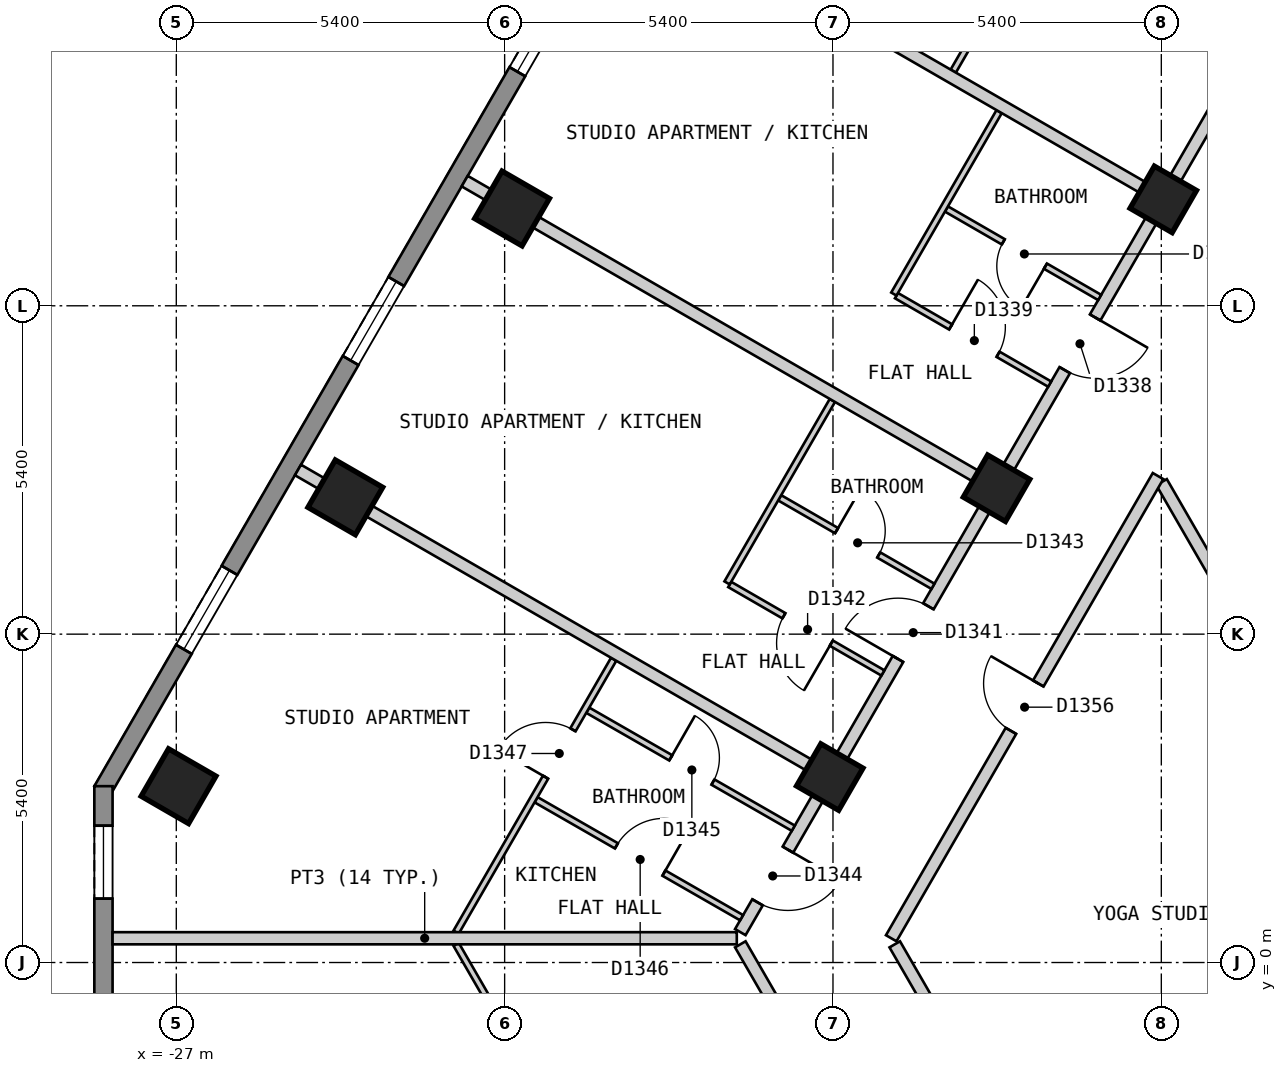
"""IFC4 building model, lengths in metres.
Left out: names, types, materials, properties, quantities, classifications, styles, units other than length and angle.
Written with IfcOpenShell. Run it as: python <this file> out.ifc"""

import sys

from ifc_helpers import new_model, si_unit, direction, frame, frame_2d, origin, origin_2d, place, context, subcontext, project, spatial, polyline, rectangle, outline, extrude, element, fill, save


model = new_model("IFC4")
c1 = context("Model", 3, precision=1e-05, world=origin(), true_north=direction((0.0, 1.0)))
c2 = subcontext(c1, "Body", "Model", "MODEL_VIEW")
j1 = project(units=[si_unit("LENGTHUNIT", "METRE"), si_unit("PLANEANGLEUNIT", "RADIAN")], contexts=[c1])
p1 = place(None, origin())
s1 = spatial("IfcSite", under=j1, at=p1, CompositionType="ELEMENT")
p2 = place(p1, origin())
s2 = spatial("IfcBuilding", under=s1, at=p2, CompositionType="ELEMENT")
p3 = place(p2, frame((0.0, 0.0, 147.6)))
s3 = spatial("IfcBuildingStorey", under=s2, at=p3, CompositionType="ELEMENT", Elevation=147.6)
for number, where, z_axis, x_axis in (
    (1, (-21.478, 12.4, 0.0), (0.0, 0.0, 1.0), (-0.5, -0.866, 0.0)),
    (2, (-24.22, 7.65, 0.0), (0.0, 0.0, 1.0), (-0.5, -0.866, 0.0)),
    (3, (-26.963, 2.9, 0.0), (0.0, 0.0, 1.0), (-0.5, -0.866, 0.0)),
):
    element("IfcColumn", number, at=place(p3, frame(where, z_axis=z_axis, x_axis=x_axis)), inside=s3, PredefinedType="COLUMN", context=c2, shape_type="SweptSolid", body=[
        extrude(rectangle(XDim=0.9, YDim=0.9, at=origin_2d()), origin(), (0.0, 0.0, 1.0), 3.0),
    ])
for number, where, z_axis, x_axis in (
    (4, (-10.768, 12.55, 0.0), (0.0, 0.0, 1.0), (-0.5, -0.866, 0.0)),
    (5, (-13.51, 7.8, 0.0), (0.0, 0.0, 1.0), (-0.5, -0.866, 0.0)),
    (6, (-16.253, 3.05, 0.0), (0.0, 0.0, 1.0), (-0.5, -0.866, 0.0)),
):
    element("IfcColumn", number, at=place(p3, frame(where, z_axis=z_axis, x_axis=x_axis)), inside=s3, PredefinedType="COLUMN", context=c2, shape_type="SweptSolid", body=[
        extrude(rectangle(XDim=0.8, YDim=0.8, at=origin_2d()), origin(), (0.0, 0.0, 1.0), 3.0),
    ])
p4 = place(p3, frame((-16.555, 23.025, 0.0), z_axis=(0.0, 0.0, 1.0), x_axis=(-0.500020536353, -0.866013546791, 0.0)))
e7 = element("IfcWall", 7, at=p4, inside=s3, PredefinedType="SOLIDWALL", context=c2, shape_type="SweptSolid", body=[
    extrude(outline(polyline([(0.0, -0.15), (23.325, -0.15), (23.245, 0.15), (0.08, 0.15), (0.0, -0.15)])), origin(), (0.0, 0.0, 1.0), 2.7),
])
p5 = place(p4, frame((2.685, 0.0, 0.15)))
e8 = element("IfcOpeningElement", 8, at=p5, cuts=e7, PredefinedType="OPENING", context=c2, shape_type="SweptSolid", body=[
    extrude(rectangle(XDim=1.5, YDim=2.1, at=frame_2d((0.75, 1.05))), frame((0.0, 0.16, 0.0), z_axis=(0.0, -1.0, 0.0), x_axis=(1.0, 0.0, 0.0)), (0.0, 0.0, 1.0), 0.32),
])
p6 = place(p4, frame((8.171, 0.0, 0.15)))
e9 = element("IfcOpeningElement", 9, at=p6, cuts=e7, PredefinedType="OPENING", context=c2, shape_type="SweptSolid", body=[
    extrude(rectangle(XDim=1.5, YDim=2.1, at=frame_2d((0.75, 1.05))), frame((0.0, 0.16, 0.0), z_axis=(0.0, -1.0, 0.0), x_axis=(1.0, 0.0, 0.0)), (0.0, 0.0, 1.0), 0.32),
])
p7 = place(p4, frame((13.655, 0.0, 0.15)))
e10 = element("IfcOpeningElement", 10, at=p7, cuts=e7, PredefinedType="OPENING", context=c2, shape_type="SweptSolid", body=[
    extrude(rectangle(XDim=1.5, YDim=2.1, at=frame_2d((0.75, 1.05))), frame((0.0, 0.16, 0.0), z_axis=(0.0, -1.0, 0.0), x_axis=(1.0, 0.0, 0.0)), (0.0, 0.0, 1.0), 0.32),
])
p8 = place(p4, frame((19.14, 0.0, 0.15)))
e11 = element("IfcOpeningElement", 11, at=p8, cuts=e7, PredefinedType="OPENING", context=c2, shape_type="SweptSolid", body=[
    extrude(rectangle(XDim=1.5, YDim=2.1, at=frame_2d((0.75, 1.05))), frame((0.0, 0.16, 0.0), z_axis=(0.0, -1.0, 0.0), x_axis=(1.0, 0.0, 0.0)), (0.0, 0.0, 1.0), 0.32),
])
p9 = place(p3, frame((-28.198, 2.9, 0.0), z_axis=(0.0, 0.0, 1.0), x_axis=(0.0, -1.0, 0.0)))
e12 = element("IfcWall", 12, at=p9, inside=s3, PredefinedType="SOLIDWALL", context=c2, shape_type="SweptSolid", body=[
    extrude(outline(polyline([(0.0, -0.15), (5.0, -0.15), (4.92, 0.15), (0.08, 0.15), (0.0, -0.15)])), origin(), (0.0, 0.0, 1.0), 2.7),
])
p10 = place(p9, frame((0.65, 0.0, 0.15)))
e13 = element("IfcOpeningElement", 13, at=p10, cuts=e12, PredefinedType="OPENING", context=c2, shape_type="SweptSolid", body=[
    extrude(rectangle(XDim=1.2, YDim=2.1, at=frame_2d((0.6, 1.05))), frame((0.0, 0.16, 0.0), z_axis=(0.0, -1.0, 0.0), x_axis=(1.0, 0.0, 0.0)), (0.0, 0.0, 1.0), 0.32),
])
p11 = place(p3, frame((-10.796, 7.9, 0.0), z_axis=(0.0, 0.0, 1.0), x_axis=(0.499954271211, -0.866051803703, 0.0)))
e14 = element("IfcWall", 14, at=p11, inside=s3, PredefinedType="PARTITIONING", context=c2, shape_type="SweptSolid", body=[
    extrude(rectangle(XDim=7.536, YDim=0.2, at=frame_2d((3.768, 0.0))), origin(), (0.0, 0.0, 1.0), 2.7),
])
p12 = place(p3, frame((-15.184, 0.299, 0.0), z_axis=(0.0, 0.0, 1.0), x_axis=(0.500149577091, -0.865939028186, 0.0)))
e15 = element("IfcWall", 15, at=p12, inside=s3, PredefinedType="PARTITIONING", context=c2, shape_type="SweptSolid", body=[
    extrude(rectangle(XDim=3.463, YDim=0.2, at=frame_2d((1.732, 0.0))), origin(), (0.0, 0.0, 1.0), 2.7),
])
p13 = place(p3, frame((-17.724, 0.299, 0.0), z_axis=(0.0, 0.0, 1.0), x_axis=(0.499923815713, -0.866069384335, 0.0)))
e16 = element("IfcWall", 16, at=p13, inside=s3, PredefinedType="PARTITIONING", context=c2, shape_type="SweptSolid", body=[
    extrude(rectangle(XDim=3.289, YDim=0.2, at=frame_2d((1.644, 0.0))), origin(), (0.0, 0.0, 1.0), 2.7),
])
p14 = place(p3, frame((-15.242, 0.399, 0.0), z_axis=(0.0, 0.0, 1.0), x_axis=(0.499953615651, 0.866052182145, 0.0)))
e17 = element("IfcWall", 17, at=p14, inside=s3, PredefinedType="PARTITIONING", context=c2, shape_type="SweptSolid", body=[
    extrude(rectangle(XDim=8.777, YDim=0.2, at=frame_2d((4.388, 0.0))), origin(), (0.0, 0.0, 1.0), 2.7),
])
p15 = place(p14, frame((3.938, 0.0, 0.0)))
e18 = element("IfcOpeningElement", 18, at=p15, cuts=e17, PredefinedType="OPENING", context=c2, shape_type="SweptSolid", body=[
    extrude(rectangle(XDim=0.9, YDim=2.1, at=frame_2d((0.45, 1.05))), frame((0.0, 0.11, 0.0), z_axis=(0.0, -1.0, 0.0), x_axis=(1.0, 0.0, 0.0)), (0.0, 0.0, 1.0), 0.22),
])
p16 = place(p3, frame((-17.724, 0.5, 0.0), z_axis=(0.0, 0.0, 1.0), x_axis=(0.499994801602, 0.86602840506, 0.0)))
e19 = element("IfcWall", 19, at=p16, inside=s3, PredefinedType="PARTITIONING", context=c2, shape_type="SweptSolid", body=[
    extrude(rectangle(XDim=16.916, YDim=0.2, at=frame_2d((8.458, 0.0))), origin(), (0.0, 0.0, 1.0), 2.7),
])
p17 = place(p16, frame((10.672, 0.0, 0.0)))
e20 = element("IfcOpeningElement", 20, at=p17, cuts=e19, PredefinedType="OPENING", context=c2, shape_type="SweptSolid", body=[
    extrude(rectangle(XDim=1.0, YDim=2.1, at=frame_2d((0.5, 1.05))), frame((0.0, 0.11, 0.0), z_axis=(0.0, -1.0, 0.0), x_axis=(1.0, 0.0, 0.0)), (0.0, 0.0, 1.0), 0.22),
])
p18 = place(p16, frame((5.187, 0.0, 0.0)))
e21 = element("IfcOpeningElement", 21, at=p18, cuts=e19, PredefinedType="OPENING", context=c2, shape_type="SweptSolid", body=[
    extrude(rectangle(XDim=1.0, YDim=2.1, at=frame_2d((0.5, 1.05))), frame((0.0, 0.11, 0.0), z_axis=(0.0, -1.0, 0.0), x_axis=(1.0, 0.0, 0.0)), (0.0, 0.0, 1.0), 0.22),
])
p19 = place(p16, frame((0.566, 0.0, 0.0)))
e22 = element("IfcOpeningElement", 22, at=p19, cuts=e19, PredefinedType="OPENING", context=c2, shape_type="SweptSolid", body=[
    extrude(rectangle(XDim=1.0, YDim=2.1, at=frame_2d((0.5, 1.05))), frame((0.0, 0.11, 0.0), z_axis=(0.0, -1.0, 0.0), x_axis=(1.0, 0.0, 0.0)), (0.0, 0.0, 1.0), 0.22),
])
p20 = place(p3, frame((-22.398, 0.299, 0.0), z_axis=(0.0, 0.0, 1.0), x_axis=(0.50004249738, -0.86600086652, 0.0)))
e23 = element("IfcWall", 23, at=p20, inside=s3, PredefinedType="PARTITIONING", context=c2, shape_type="SweptSolid", body=[
    extrude(rectangle(XDim=3.236, YDim=0.1, at=frame_2d((1.618, 0.0))), origin(), (0.0, 0.0, 1.0), 2.7),
])
p21 = place(p3, frame((-17.898, 6.217, 0.0), z_axis=(0.0, 0.0, 1.0), x_axis=(0.86592000186, -0.500182517066, 0.0)))
e24 = element("IfcWall", 24, at=p21, inside=s3, PredefinedType="PARTITIONING", context=c2, shape_type="SweptSolid", body=[
    extrude(rectangle(XDim=2.909, YDim=0.1, at=frame_2d((1.455, 0.0))), origin(), (0.0, 0.0, 1.0), 2.7),
])
p22 = place(p21, frame((1.029, 0.0, 0.0)))
e25 = element("IfcOpeningElement", 25, at=p22, cuts=e24, PredefinedType="OPENING", context=c2, shape_type="SweptSolid", body=[
    extrude(rectangle(XDim=0.9, YDim=2.1, at=frame_2d((0.45, 1.05))), frame((0.0, 0.06, 0.0), z_axis=(0.0, -1.0, 0.0), x_axis=(1.0, 0.0, 0.0)), (0.0, 0.0, 1.0), 0.12),
])
p23 = place(p3, frame((-20.233, 4.149, 0.0), z_axis=(0.0, 0.0, 1.0), x_axis=(0.867293167797, -0.497797711016, 0.0)))
e26 = element("IfcWall", 26, at=p23, inside=s3, PredefinedType="PARTITIONING", context=c2, shape_type="SweptSolid", body=[
    extrude(rectangle(XDim=3.897, YDim=0.1, at=frame_2d((1.948, 0.0))), origin(), (0.0, 0.0, 1.0), 2.7),
])
p24 = place(p23, frame((1.574, 0.0, 0.0)))
e27 = element("IfcOpeningElement", 27, at=p24, cuts=e26, PredefinedType="OPENING", context=c2, shape_type="SweptSolid", body=[
    extrude(rectangle(XDim=0.8, YDim=2.1, at=frame_2d((0.4, 1.05))), frame((0.0, 0.06, 0.0), z_axis=(0.0, -1.0, 0.0), x_axis=(1.0, 0.0, 0.0)), (0.0, 0.0, 1.0), 0.12),
])
p25 = place(p3, frame((-21.083, 2.677, 0.0), z_axis=(0.0, 0.0, 1.0), x_axis=(0.867308690764, -0.497770664991, 0.0)))
e28 = element("IfcWall", 28, at=p25, inside=s3, PredefinedType="PARTITIONING", context=c2, shape_type="SweptSolid", body=[
    extrude(rectangle(XDim=3.897, YDim=0.1, at=frame_2d((1.949, 0.0))), origin(), (0.0, 0.0, 1.0), 2.7),
])
p26 = place(p25, frame((1.524, 0.0, 0.0)))
e29 = element("IfcOpeningElement", 29, at=p26, cuts=e28, PredefinedType="OPENING", context=c2, shape_type="SweptSolid", body=[
    extrude(rectangle(XDim=0.9, YDim=2.1, at=frame_2d((0.45, 1.05))), frame((0.0, 0.06, 0.0), z_axis=(0.0, -1.0, 0.0), x_axis=(1.0, 0.0, 0.0)), (0.0, 0.0, 1.0), 0.12),
])
p27 = place(p3, frame((-17.076, 7.642, 0.0), z_axis=(0.0, 0.0, 1.0), x_axis=(0.866003949776, -0.500037157592, 0.0)))
e30 = element("IfcWall", 30, at=p27, inside=s3, PredefinedType="PARTITIONING", context=c2, shape_type="SweptSolid", body=[
    extrude(rectangle(XDim=2.91, YDim=0.1, at=frame_2d((1.455, 0.0))), origin(), (0.0, 0.0, 1.0), 2.7),
])
p28 = place(p27, frame((1.08, 0.0, 0.0)))
e31 = element("IfcOpeningElement", 31, at=p28, cuts=e30, PredefinedType="OPENING", context=c2, shape_type="SweptSolid", body=[
    extrude(rectangle(XDim=0.8, YDim=2.1, at=frame_2d((0.4, 1.05))), frame((0.0, 0.06, 0.0), z_axis=(0.0, -1.0, 0.0), x_axis=(1.0, 0.0, 0.0)), (0.0, 0.0, 1.0), 0.12),
])
p29 = place(p3, frame((-14.334, 12.392, 0.0), z_axis=(0.0, 0.0, 1.0), x_axis=(0.866003949776, -0.500037157592, 0.0)))
e32 = element("IfcWall", 32, at=p29, inside=s3, PredefinedType="PARTITIONING", context=c2, shape_type="SweptSolid", body=[
    extrude(rectangle(XDim=2.91, YDim=0.1, at=frame_2d((1.455, 0.0))), origin(), (0.0, 0.0, 1.0), 2.7),
])
p30 = place(p29, frame((1.08, 0.0, 0.0)))
e33 = element("IfcOpeningElement", 33, at=p30, cuts=e32, PredefinedType="OPENING", context=c2, shape_type="SweptSolid", body=[
    extrude(rectangle(XDim=0.8, YDim=2.1, at=frame_2d((0.4, 1.05))), frame((0.0, 0.06, 0.0), z_axis=(0.0, -1.0, 0.0), x_axis=(1.0, 0.0, 0.0)), (0.0, 0.0, 1.0), 0.12),
])
p31 = place(p3, frame((-15.156, 10.967, 0.0), z_axis=(0.0, 0.0, 1.0), x_axis=(0.866003949776, -0.500037157592, 0.0)))
e34 = element("IfcWall", 34, at=p31, inside=s3, PredefinedType="PARTITIONING", context=c2, shape_type="SweptSolid", body=[
    extrude(rectangle(XDim=2.91, YDim=0.1, at=frame_2d((1.455, 0.0))), origin(), (0.0, 0.0, 1.0), 2.7),
])
p32 = place(p31, frame((1.029, 0.0, 0.0)))
e35 = element("IfcOpeningElement", 35, at=p32, cuts=e34, PredefinedType="OPENING", context=c2, shape_type="SweptSolid", body=[
    extrude(rectangle(XDim=0.9, YDim=2.1, at=frame_2d((0.45, 1.05))), frame((0.0, 0.06, 0.0), z_axis=(0.0, -1.0, 0.0), x_axis=(1.0, 0.0, 0.0)), (0.0, 0.0, 1.0), 0.12),
])
p33 = place(p3, frame((-17.942, 6.243, 0.0), z_axis=(0.0, 0.0, 1.0), x_axis=(0.49997462182, 0.866040055388, 0.0)))
e36 = element("IfcWall", 36, at=p33, inside=s3, PredefinedType="PARTITIONING", context=c2, shape_type="SweptSolid", body=[
    extrude(rectangle(XDim=3.464, YDim=0.1, at=frame_2d((1.732, 0.0))), origin(), (0.0, 0.0, 1.0), 2.7),
])
p34 = place(p3, frame((-15.199, 10.993, 0.0), z_axis=(0.0, 0.0, 1.0), x_axis=(0.499885210257, 0.866091667531, 0.0)))
e37 = element("IfcWall", 37, at=p34, inside=s3, PredefinedType="PARTITIONING", context=c2, shape_type="SweptSolid", body=[
    extrude(rectangle(XDim=3.463, YDim=0.1, at=frame_2d((1.731, 0.0))), origin(), (0.0, 0.0, 1.0), 2.7),
])
p35 = place(p3, frame((-22.398, 0.499, 0.0), z_axis=(0.0, 0.0, 1.0), x_axis=(0.499984806807, 0.866034175401, 0.0)))
e38 = element("IfcWall", 38, at=p35, inside=s3, PredefinedType="PARTITIONING", context=c2, shape_type="SweptSolid", body=[
    extrude(rectangle(XDim=5.182, YDim=0.1, at=frame_2d((2.591, 0.0))), origin(), (0.0, 0.0, 1.0), 2.7),
])
p36 = place(p35, frame((2.943, 0.0, 0.0)))
e39 = element("IfcOpeningElement", 39, at=p36, cuts=e38, PredefinedType="OPENING", context=c2, shape_type="SweptSolid", body=[
    extrude(rectangle(XDim=0.9, YDim=2.1, at=frame_2d((0.45, 1.05))), frame((0.0, 0.06, 0.0), z_axis=(0.0, -1.0, 0.0), x_axis=(1.0, 0.0, 0.0)), (0.0, 0.0, 1.0), 0.12),
])
p37 = place(p3, frame((-14.222, 14.659, 0.0), z_axis=(0.0, 0.0, 1.0), x_axis=(0.500053212623, 0.865994679283, 0.0)))
e40 = element("IfcWall", 40, at=p37, inside=s3, PredefinedType="PARTITIONING", context=c2, shape_type="SweptSolid", body=[
    extrude(rectangle(XDim=5.239, YDim=0.1, at=frame_2d((2.62, 0.0))), origin(), (0.0, 0.0, 1.0), 2.7),
])
p38 = place(p37, frame((2.198, 0.0, 0.0)))
e41 = element("IfcOpeningElement", 41, at=p38, cuts=e40, PredefinedType="OPENING", context=c2, shape_type="SweptSolid", body=[
    extrude(rectangle(XDim=0.8, YDim=2.1, at=frame_2d((0.4, 1.05))), frame((0.0, 0.06, 0.0), z_axis=(0.0, -1.0, 0.0), x_axis=(1.0, 0.0, 0.0)), (0.0, 0.0, 1.0), 0.12),
])
p39 = place(p3, frame((-24.999, 8.1, 0.0), z_axis=(0.0, 0.0, 1.0), x_axis=(0.866016855193, -0.500014806302, 0.0)))
e42 = element("IfcWall", 42, at=p39, inside=s3, PredefinedType="PARTITIONING", context=c2, shape_type="SweptSolid", body=[
    extrude(rectangle(XDim=10.0, YDim=0.2, at=frame_2d((5.0, 0.0))), origin(), (0.0, 0.0, 1.0), 2.7),
])
p40 = place(p3, frame((-22.257, 12.85, 0.0), z_axis=(0.0, 0.0, 1.0), x_axis=(0.866047370643, -0.499961950354, 0.0)))
e43 = element("IfcWall", 43, at=p40, inside=s3, PredefinedType="PARTITIONING", context=c2, shape_type="SweptSolid", body=[
    extrude(rectangle(XDim=10.001, YDim=0.2, at=frame_2d((5.0, 0.0))), origin(), (0.0, 0.0, 1.0), 2.7),
])
p41 = place(p3, frame((-19.514, 17.599, 0.0), z_axis=(0.0, 0.0, 1.0), x_axis=(0.866059142644, -0.499941558027, 0.0)))
e44 = element("IfcWall", 44, at=p41, inside=s3, PredefinedType="PARTITIONING", context=c2, shape_type="SweptSolid", body=[
    extrude(rectangle(XDim=9.999, YDim=0.2, at=frame_2d((5.0, 0.0))), origin(), (0.0, 0.0, 1.0), 2.7),
])
p42 = place(p3, frame((-28.048, 0.399, 0.0), z_axis=(0.0, 0.0, 1.0), x_axis=(1.0, 0.0, 0.0)))
e45 = element("IfcWall", 45, at=p42, inside=s3, PredefinedType="PARTITIONING", context=c2, shape_type="SweptSolid", body=[
    extrude(rectangle(XDim=10.266, YDim=0.2, at=frame_2d((5.133, 0.0))), origin(), (0.0, 0.0, 1.0), 2.7),
])
p43 = place(p6, origin())
e46 = element("IfcWindow", 46, at=p43, inside=s3, PartitioningType="SINGLE_PANEL", PredefinedType="WINDOW", context=c2, shape_type="SweptSolid", body=[
    extrude(rectangle(XDim=1.5, YDim=2.1, at=frame_2d((0.75, 1.05))), frame((0.0, 0.03, 0.0), z_axis=(0.0, -1.0, 0.0), x_axis=(1.0, 0.0, 0.0)), (0.0, 0.0, 1.0), 0.06),
])
fill(e9, e46)
p44 = place(p7, origin())
e47 = element("IfcWindow", 47, at=p44, inside=s3, PartitioningType="SINGLE_PANEL", PredefinedType="WINDOW", context=c2, shape_type="SweptSolid", body=[
    extrude(rectangle(XDim=1.5, YDim=2.1, at=frame_2d((0.75, 1.05))), frame((0.0, 0.03, 0.0), z_axis=(0.0, -1.0, 0.0), x_axis=(1.0, 0.0, 0.0)), (0.0, 0.0, 1.0), 0.06),
])
fill(e10, e47)
p45 = place(p8, origin())
e48 = element("IfcWindow", 48, at=p45, inside=s3, PartitioningType="SINGLE_PANEL", PredefinedType="WINDOW", context=c2, shape_type="SweptSolid", body=[
    extrude(rectangle(XDim=1.5, YDim=2.1, at=frame_2d((0.75, 1.05))), frame((0.0, 0.03, 0.0), z_axis=(0.0, -1.0, 0.0), x_axis=(1.0, 0.0, 0.0)), (0.0, 0.0, 1.0), 0.06),
])
fill(e11, e48)
p46 = place(p10, origin())
e49 = element("IfcWindow", 49, at=p46, inside=s3, PartitioningType="SINGLE_PANEL", PredefinedType="WINDOW", context=c2, shape_type="SweptSolid", body=[
    extrude(rectangle(XDim=1.2, YDim=2.1, at=frame_2d((0.6, 1.05))), frame((0.0, 0.03, 0.0), z_axis=(0.0, -1.0, 0.0), x_axis=(1.0, 0.0, 0.0)), (0.0, 0.0, 1.0), 0.06),
])
fill(e13, e49)
p47 = place(p17, origin())
e50 = element("IfcDoor", 50, at=p47, inside=s3, OperationType="SINGLE_SWING_RIGHT", PredefinedType="DOOR", context=c2, shape_type="SweptSolid", body=[
    extrude(rectangle(XDim=1.0, YDim=2.1, at=frame_2d((0.5, 1.05))), frame((0.0, 0.025, 0.0), z_axis=(0.0, -1.0, 0.0), x_axis=(1.0, 0.0, 0.0)), (0.0, 0.0, 1.0), 0.05),
])
fill(e20, e50)
p48 = place(p32, origin())
e51 = element("IfcDoor", 51, at=p48, inside=s3, OperationType="SINGLE_SWING_LEFT", PredefinedType="DOOR", context=c2, shape_type="SweptSolid", body=[
    extrude(rectangle(XDim=0.9, YDim=2.1, at=frame_2d((0.45, 1.05))), frame((0.0, 0.025, 0.0), z_axis=(0.0, -1.0, 0.0), x_axis=(1.0, 0.0, 0.0)), (0.0, 0.0, 1.0), 0.05),
])
fill(e35, e51)
p49 = place(p30, origin())
e52 = element("IfcDoor", 52, at=p49, inside=s3, OperationType="SINGLE_SWING_RIGHT", PredefinedType="DOOR", context=c2, shape_type="SweptSolid", body=[
    extrude(rectangle(XDim=0.8, YDim=2.1, at=frame_2d((0.4, 1.05))), frame((0.0, 0.025, 0.0), z_axis=(0.0, -1.0, 0.0), x_axis=(1.0, 0.0, 0.0)), (0.0, 0.0, 1.0), 0.05),
])
fill(e33, e52)
p50 = place(p18, origin())
e53 = element("IfcDoor", 53, at=p50, inside=s3, OperationType="SINGLE_SWING_LEFT", PredefinedType="DOOR", context=c2, shape_type="SweptSolid", body=[
    extrude(rectangle(XDim=1.0, YDim=2.1, at=frame_2d((0.5, 1.05))), frame((0.0, 0.025, 0.0), z_axis=(0.0, -1.0, 0.0), x_axis=(1.0, 0.0, 0.0)), (0.0, 0.0, 1.0), 0.05),
])
fill(e21, e53)
p51 = place(p22, origin())
e54 = element("IfcDoor", 54, at=p51, inside=s3, OperationType="SINGLE_SWING_RIGHT", PredefinedType="DOOR", context=c2, shape_type="SweptSolid", body=[
    extrude(rectangle(XDim=0.9, YDim=2.1, at=frame_2d((0.45, 1.05))), frame((0.0, 0.025, 0.0), z_axis=(0.0, -1.0, 0.0), x_axis=(1.0, 0.0, 0.0)), (0.0, 0.0, 1.0), 0.05),
])
fill(e25, e54)
p52 = place(p28, origin())
e55 = element("IfcDoor", 55, at=p52, inside=s3, OperationType="SINGLE_SWING_LEFT", PredefinedType="DOOR", context=c2, shape_type="SweptSolid", body=[
    extrude(rectangle(XDim=0.8, YDim=2.1, at=frame_2d((0.4, 1.05))), frame((0.0, 0.025, 0.0), z_axis=(0.0, -1.0, 0.0), x_axis=(1.0, 0.0, 0.0)), (0.0, 0.0, 1.0), 0.05),
])
fill(e31, e55)
p53 = place(p19, origin())
e56 = element("IfcDoor", 56, at=p53, inside=s3, OperationType="SINGLE_SWING_RIGHT", PredefinedType="DOOR", context=c2, shape_type="SweptSolid", body=[
    extrude(rectangle(XDim=1.0, YDim=2.1, at=frame_2d((0.5, 1.05))), frame((0.0, 0.025, 0.0), z_axis=(0.0, -1.0, 0.0), x_axis=(1.0, 0.0, 0.0)), (0.0, 0.0, 1.0), 0.05),
])
fill(e22, e56)
p54 = place(p24, origin())
e57 = element("IfcDoor", 57, at=p54, inside=s3, OperationType="SINGLE_SWING_LEFT", PredefinedType="DOOR", context=c2, shape_type="SweptSolid", body=[
    extrude(rectangle(XDim=0.8, YDim=2.1, at=frame_2d((0.4, 1.05))), frame((0.0, 0.025, 0.0), z_axis=(0.0, -1.0, 0.0), x_axis=(1.0, 0.0, 0.0)), (0.0, 0.0, 1.0), 0.05),
])
fill(e27, e57)
p55 = place(p26, origin())
e58 = element("IfcDoor", 58, at=p55, inside=s3, OperationType="SINGLE_SWING_RIGHT", PredefinedType="DOOR", context=c2, shape_type="SweptSolid", body=[
    extrude(rectangle(XDim=0.9, YDim=2.1, at=frame_2d((0.45, 1.05))), frame((0.0, 0.025, 0.0), z_axis=(0.0, -1.0, 0.0), x_axis=(1.0, 0.0, 0.0)), (0.0, 0.0, 1.0), 0.05),
])
fill(e29, e58)
p56 = place(p36, origin())
e59 = element("IfcDoor", 59, at=p56, inside=s3, OperationType="SINGLE_SWING_LEFT", PredefinedType="DOOR", context=c2, shape_type="SweptSolid", body=[
    extrude(rectangle(XDim=0.9, YDim=2.1, at=frame_2d((0.45, 1.05))), frame((0.0, 0.025, 0.0), z_axis=(0.0, -1.0, 0.0), x_axis=(1.0, 0.0, 0.0)), (0.0, 0.0, 1.0), 0.05),
])
fill(e39, e59)
p57 = place(p15, origin())
e60 = element("IfcDoor", 60, at=p57, inside=s3, OperationType="SINGLE_SWING_RIGHT", PredefinedType="DOOR", context=c2, shape_type="SweptSolid", body=[
    extrude(rectangle(XDim=0.9, YDim=2.1, at=frame_2d((0.45, 1.05))), frame((0.0, 0.025, 0.0), z_axis=(0.0, -1.0, 0.0), x_axis=(1.0, 0.0, 0.0)), (0.0, 0.0, 1.0), 0.05),
])
fill(e18, e60)
save(model, sys.argv[1])
